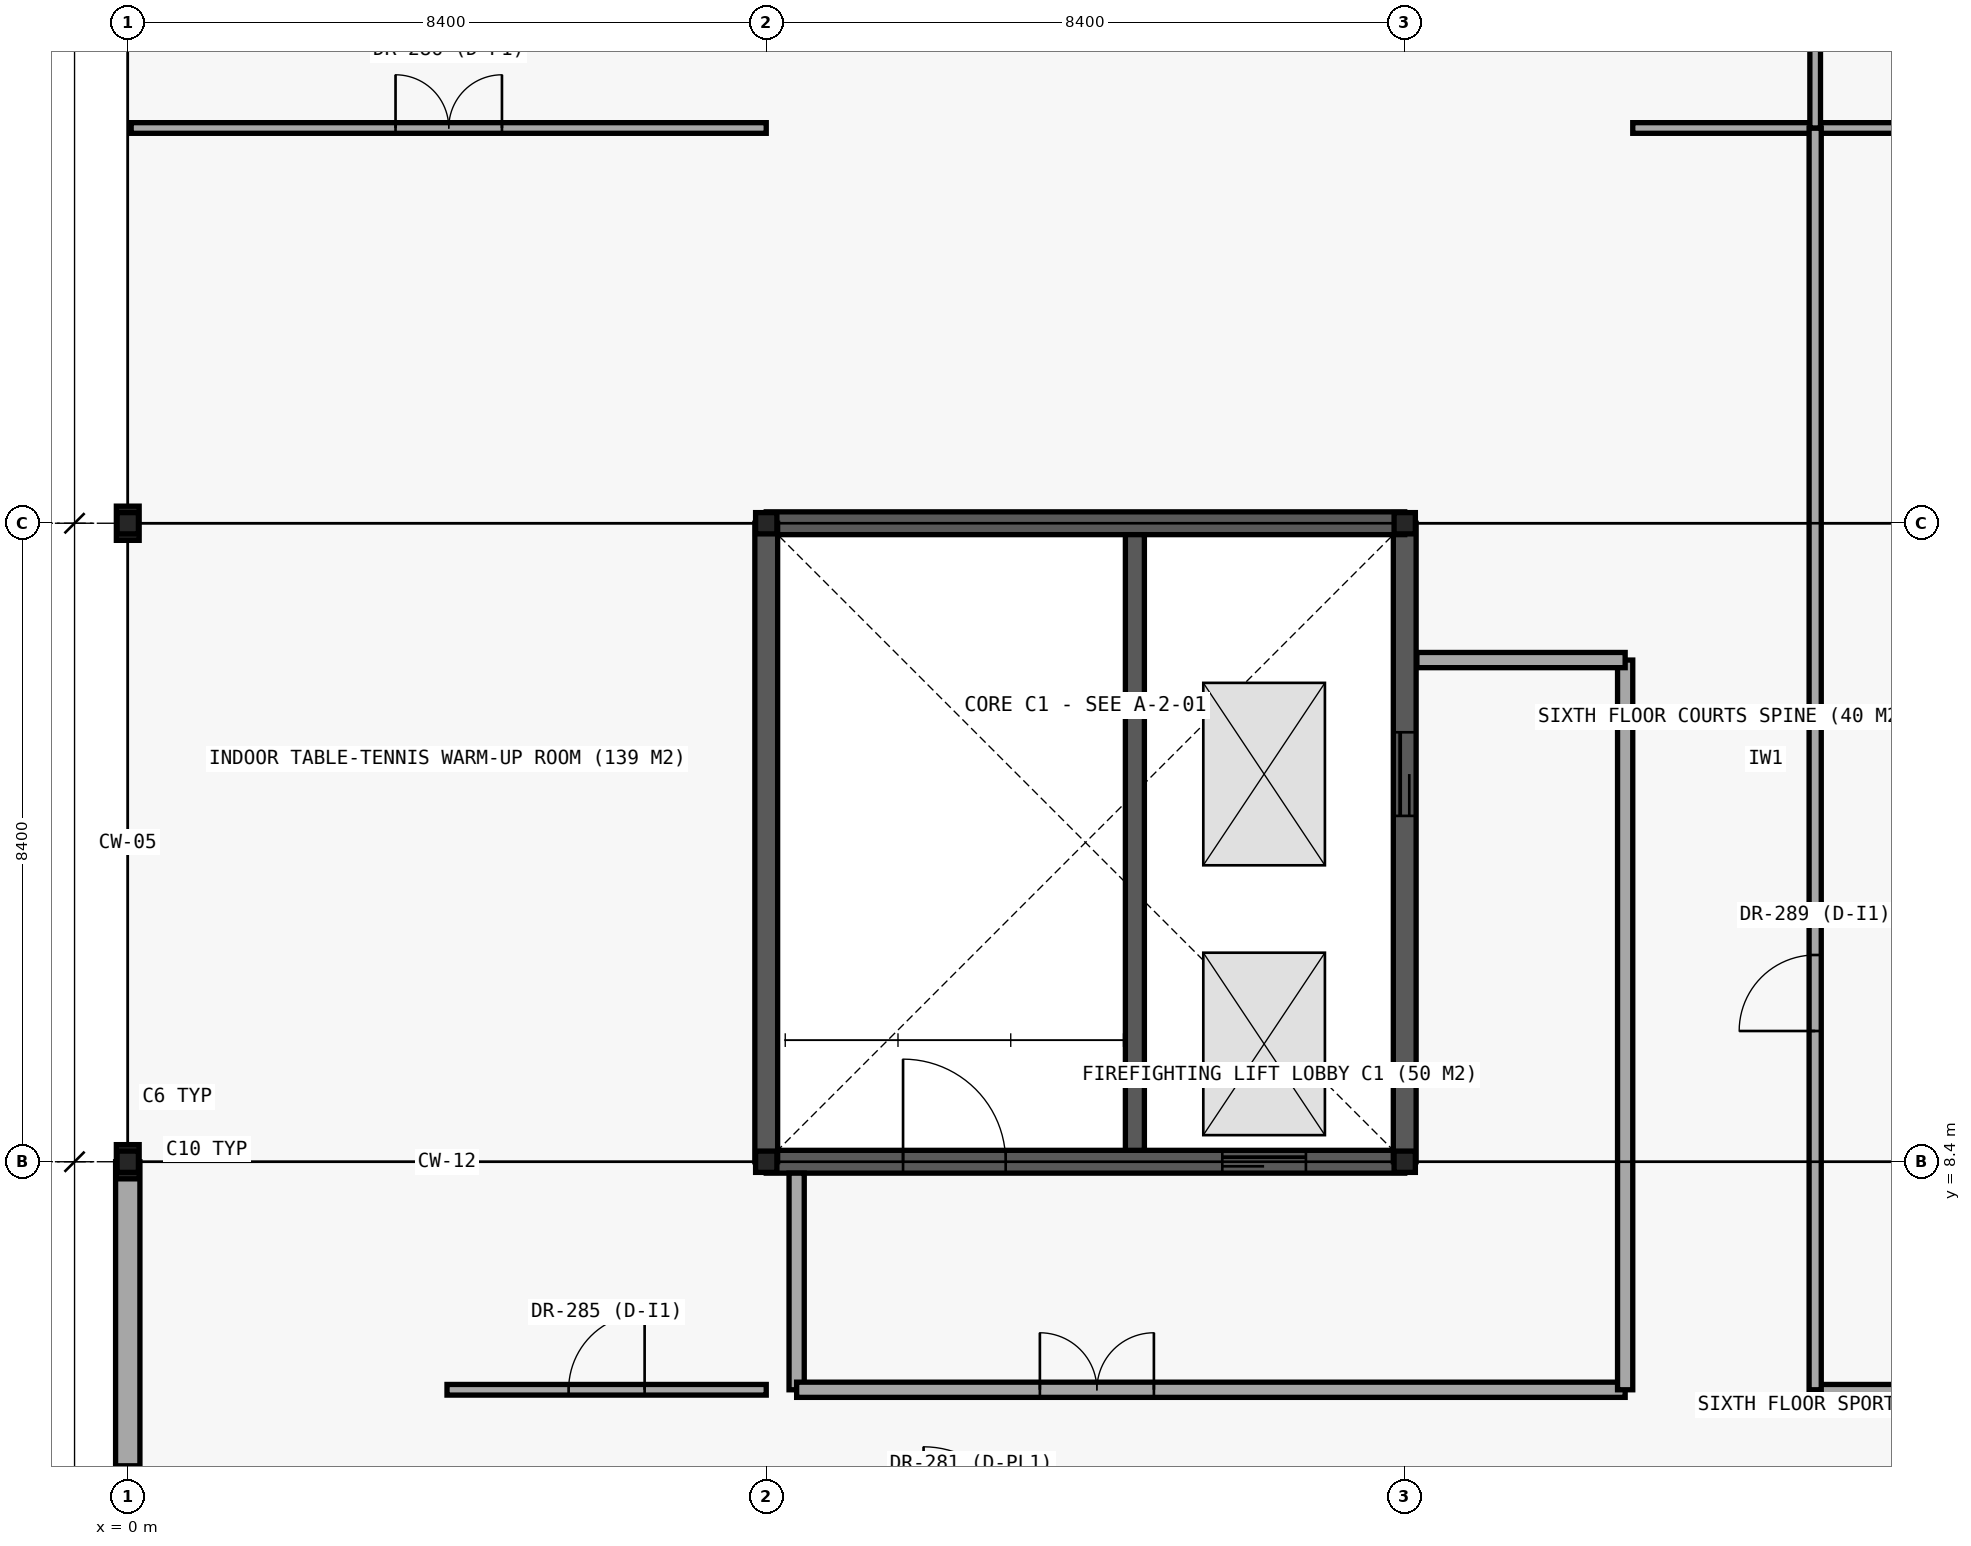
"""IFC4 building model, lengths in metres.
Left out: names, types, materials, properties, quantities, classifications, styles, units other than length and angle.
Written with IfcOpenShell. Run it as: python <this file> out.ifc"""

import sys

from ifc_helpers import new_model, si_unit, direction, frame, frame_2d, origin, origin_2d, place, context, subcontext, project, spatial, rectangle, i_section, extrude, element, fill, save


model = new_model("IFC4")
c1 = context("Model", 3, precision=1e-05, world=origin(), true_north=direction((0.0, 1.0)))
c2 = subcontext(c1, "Body", "Model", "MODEL_VIEW")
j1 = project(units=[si_unit("LENGTHUNIT", "METRE"), si_unit("PLANEANGLEUNIT", "RADIAN")], contexts=[c1])
p1 = place(None, origin())
s1 = spatial("IfcSite", under=j1, at=p1, CompositionType="ELEMENT")
p2 = place(p1, origin())
s2 = spatial("IfcBuilding", under=s1, at=p2, CompositionType="ELEMENT")
p3 = place(p2, frame((0.0, 0.0, 26.4)))
s3 = spatial("IfcBuildingStorey", under=s2, at=p3, CompositionType="ELEMENT", Elevation=26.4)
p4 = place(p3, frame((8.4, 8.4, 0.0), z_axis=(0.0, 0.0, 1.0), x_axis=(1.0, 0.0, 0.0)))
e1 = element("IfcWall", 1, at=p4, inside=s3, PredefinedType="SHEAR", context=c2, shape_type="SweptSolid", body=[
    extrude(rectangle(XDim=8.4, YDim=0.3, at=frame_2d((4.2, 0.0))), origin(), (0.0, 0.0, 1.0), 4.8),
])
p5 = place(p4, frame((1.8, 0.0, 0.0)))
e2 = element("IfcOpeningElement", 2, at=p5, cuts=e1, PredefinedType="OPENING", context=c2, shape_type="SweptSolid", body=[
    extrude(rectangle(XDim=1.35, YDim=2.2, at=frame_2d((0.675, 1.1))), frame((0.0, 0.16, 0.0), z_axis=(0.0, -1.0, 0.0), x_axis=(1.0, 0.0, 0.0)), (0.0, 0.0, 1.0), 0.32),
])
p6 = place(p4, frame((6.0, 0.0, 0.0)))
e3 = element("IfcOpeningElement", 3, at=p6, cuts=e1, PredefinedType="OPENING", context=c2, shape_type="SweptSolid", body=[
    extrude(rectangle(XDim=1.1, YDim=2.2, at=frame_2d((0.55, 1.1))), frame((0.0, 0.16, 0.0), z_axis=(0.0, -1.0, 0.0), x_axis=(1.0, 0.0, 0.0)), (0.0, 0.0, 1.0), 0.32),
])
p7 = place(p3, frame((16.8, 8.4, 0.0), z_axis=(0.0, 0.0, 1.0), x_axis=(0.0, 1.0, 0.0)))
e4 = element("IfcWall", 4, at=p7, inside=s3, PredefinedType="SHEAR", context=c2, shape_type="SweptSolid", body=[
    extrude(rectangle(XDim=8.4, YDim=0.3, at=frame_2d((4.2, 0.0))), origin(), (0.0, 0.0, 1.0), 4.8),
])
p8 = place(p7, frame((4.55, 0.0, 0.0)))
e5 = element("IfcOpeningElement", 5, at=p8, cuts=e4, PredefinedType="OPENING", context=c2, shape_type="SweptSolid", body=[
    extrude(rectangle(XDim=1.1, YDim=2.2, at=frame_2d((0.55, 1.1))), frame((0.0, 0.16, 0.0), z_axis=(0.0, -1.0, 0.0), x_axis=(1.0, 0.0, 0.0)), (0.0, 0.0, 1.0), 0.32),
])
for number, where, z_axis, x_axis in (
    (6, (16.8, 16.8, 0.0), (0.0, 0.0, 1.0), (-1.0, 0.0, 0.0)),
    (7, (8.4, 16.8, 0.0), (0.0, 0.0, 1.0), (0.0, -1.0, 0.0)),
):
    element("IfcWall", number, at=place(p3, frame(where, z_axis=z_axis, x_axis=x_axis)), inside=s3, PredefinedType="SHEAR", context=c2, shape_type="SweptSolid", body=[
        extrude(rectangle(XDim=8.4, YDim=0.3, at=frame_2d((4.2, 0.0))), origin(), (0.0, 0.0, 1.0), 4.8),
    ])
p9 = place(p3, frame((13.25, 8.55, 0.0), z_axis=(0.0, 0.0, 1.0), x_axis=(0.0, 1.0, 0.0)))
e8 = element("IfcWall", 8, at=p9, inside=s3, PredefinedType="SHEAR", context=c2, shape_type="SweptSolid", body=[
    extrude(rectangle(XDim=8.1, YDim=0.25, at=frame_2d((4.05, 0.0))), origin(), (0.0, 0.0, 1.0), 4.8),
])
for number, where, z_axis, x_axis in (
    (9, (0.0, 8.4, 0.0), (0.0, 0.0, 1.0), (1.0, 0.0, 0.0)),
    (10, (0.0, 16.8, 0.0), (0.0, 0.0, 1.0), (1.0, 0.0, 0.0)),
):
    element("IfcColumn", number, at=place(p3, frame(where, z_axis=z_axis, x_axis=x_axis)), inside=s3, PredefinedType="COLUMN", context=c2, shape_type="SweptSolid", body=[
        extrude(i_section(OverallWidth=0.3, OverallDepth=0.45, WebThickness=0.014, FlangeThickness=0.026, FilletRadius=0.027, at=origin_2d()), origin(), (0.0, 0.0, 1.0), 4.63),
    ])
for number, where, z_axis, x_axis in (
    (11, (0.0, 8.4, 4.63), (0.0, 0.0, 1.0), (1.0, 0.0, 0.0)),
    (12, (8.4, 8.4, 4.63), (0.0, 0.0, 1.0), (1.0, 0.0, 0.0)),
    (13, (16.8, 8.4, 4.63), (0.0, 0.0, 1.0), (1.0, 0.0, 0.0)),
    (14, (0.0, 16.8, 4.63), (0.0, 0.0, 1.0), (1.0, 0.0, 0.0)),
    (15, (8.4, 16.8, 4.63), (0.0, 0.0, 1.0), (1.0, 0.0, 0.0)),
    (16, (16.8, 16.8, 4.63), (0.0, 0.0, 1.0), (1.0, 0.0, 0.0)),
):
    element("IfcColumn", number, at=place(p3, frame(where, z_axis=z_axis, x_axis=x_axis)), inside=s3, PredefinedType="COLUMN", context=c2, shape_type="SweptSolid", body=[
        extrude(i_section(OverallWidth=0.28, OverallDepth=0.28, WebThickness=0.01, FlangeThickness=0.018, FilletRadius=0.024, at=origin_2d()), origin(), (0.0, 0.0, 1.0), 2.4),
    ])
p10 = place(p3, frame((0.0, 8.4, 0.0), z_axis=(0.0, 0.0, 1.0), x_axis=(0.0, -1.0, 0.0)))
e17 = element("IfcWall", 17, at=p10, inside=s3, PredefinedType="STANDARD", context=c2, shape_type="SweptSolid", body=[
    extrude(rectangle(XDim=4.2, YDim=0.32, at=frame_2d((2.1, 0.0))), origin(), (0.0, 0.0, 1.0), 4.06),
])
p11 = place(p3, frame((8.8, 5.4, 0.0), z_axis=(0.0, 0.0, 1.0), x_axis=(0.0, 1.0, 0.0)))
e18 = element("IfcWall", 18, at=p11, inside=s3, PredefinedType="PARTITIONING", context=c2, shape_type="SweptSolid", body=[
    extrude(rectangle(XDim=2.85, YDim=0.2, at=frame_2d((1.425, 0.0))), origin(), (0.0, 0.0, 1.0), 4.12),
])
p12 = place(p3, frame((8.8, 5.4, 0.0), z_axis=(0.0, 0.0, 1.0), x_axis=(1.0, 0.0, 0.0)))
e19 = element("IfcWall", 19, at=p12, inside=s3, PredefinedType="PARTITIONING", context=c2, shape_type="SweptSolid", body=[
    extrude(rectangle(XDim=10.9, YDim=0.2, at=frame_2d((5.45, 0.0))), origin(), (0.0, 0.0, 1.0), 4.12),
])
p13 = place(p12, frame((3.2, 0.0, 0.0)))
e20 = element("IfcOpeningElement", 20, at=p13, cuts=e19, PredefinedType="OPENING", context=c2, shape_type="SweptSolid", body=[
    extrude(rectangle(XDim=1.5, YDim=2.2, at=frame_2d((0.75, 1.1))), frame((0.0, 0.11, 0.0), z_axis=(0.0, -1.0, 0.0), x_axis=(1.0, 0.0, 0.0)), (0.0, 0.0, 1.0), 0.22),
])
p14 = place(p3, frame((19.7, 5.4, 0.0), z_axis=(0.0, 0.0, 1.0), x_axis=(0.0, 1.0, 0.0)))
e21 = element("IfcWall", 21, at=p14, inside=s3, PredefinedType="PARTITIONING", context=c2, shape_type="SweptSolid", body=[
    extrude(rectangle(XDim=9.6, YDim=0.2, at=frame_2d((4.8, 0.0))), origin(), (0.0, 0.0, 1.0), 4.12),
])
p15 = place(p3, frame((16.96, 15.0, 0.0), z_axis=(0.0, 0.0, 1.0), x_axis=(1.0, 0.0, 0.0)))
e22 = element("IfcWall", 22, at=p15, inside=s3, PredefinedType="PARTITIONING", context=c2, shape_type="SweptSolid", body=[
    extrude(rectangle(XDim=2.74, YDim=0.2, at=frame_2d((1.37, 0.0))), origin(), (0.0, 0.0, 1.0), 4.12),
])
p16 = place(p3, frame((4.2, 5.4, 0.0), z_axis=(0.0, 0.0, 1.0), x_axis=(1.0, 0.0, 0.0)))
e23 = element("IfcWall", 23, at=p16, inside=s3, PredefinedType="PARTITIONING", context=c2, shape_type="SweptSolid", body=[
    extrude(rectangle(XDim=4.2, YDim=0.14, at=frame_2d((2.1, 0.0))), origin(), (0.0, 0.0, 1.0), 4.1),
])
p17 = place(p16, frame((1.6, 0.0, 0.0)))
e24 = element("IfcOpeningElement", 24, at=p17, cuts=e23, PredefinedType="OPENING", context=c2, shape_type="SweptSolid", body=[
    extrude(rectangle(XDim=1.0, YDim=2.15, at=frame_2d((0.5, 1.075))), frame((0.0, 0.08, 0.0), z_axis=(0.0, -1.0, 0.0), x_axis=(1.0, 0.0, 0.0)), (0.0, 0.0, 1.0), 0.16),
])
p18 = place(p3, frame((22.2, 5.4, 0.0), z_axis=(0.0, 0.0, 1.0), x_axis=(1.0, 0.0, 0.0)))
e25 = element("IfcWall", 25, at=p18, inside=s3, PredefinedType="PARTITIONING", context=c2, shape_type="SweptSolid", body=[
    extrude(rectangle(XDim=11.4, YDim=0.14, at=frame_2d((5.7, 0.0))), origin(), (0.0, 0.0, 1.0), 4.1),
])
p19 = place(p3, frame((0.045, 22.0, 0.0), z_axis=(0.0, 0.0, 1.0), x_axis=(1.0, 0.0, 0.0)))
e26 = element("IfcWall", 26, at=p19, inside=s3, PredefinedType="PARTITIONING", context=c2, shape_type="SweptSolid", body=[
    extrude(rectangle(XDim=8.355, YDim=0.14, at=frame_2d((4.177, 0.0))), origin(), (0.0, 0.0, 1.0), 4.1),
])
p20 = place(p19, frame((3.478, 0.0, 0.0)))
e27 = element("IfcOpeningElement", 27, at=p20, cuts=e26, PredefinedType="OPENING", context=c2, shape_type="SweptSolid", body=[
    extrude(rectangle(XDim=1.4, YDim=2.25, at=frame_2d((0.7, 1.125))), frame((0.0, 0.08, 0.0), z_axis=(0.0, -1.0, 0.0), x_axis=(1.0, 0.0, 0.0)), (0.0, 0.0, 1.0), 0.16),
])
p21 = place(p3, frame((19.8, 22.0, 0.0), z_axis=(0.0, 0.0, 1.0), x_axis=(1.0, 0.0, 0.0)))
e28 = element("IfcWall", 28, at=p21, inside=s3, PredefinedType="PARTITIONING", context=c2, shape_type="SweptSolid", body=[
    extrude(rectangle(XDim=2.4, YDim=0.14, at=frame_2d((1.2, 0.0))), origin(), (0.0, 0.0, 1.0), 4.1),
])
p22 = place(p3, frame((22.2, 22.0, 0.0), z_axis=(0.0, 0.0, 1.0), x_axis=(1.0, 0.0, 0.0)))
e29 = element("IfcWall", 29, at=p22, inside=s3, PredefinedType="PARTITIONING", context=c2, shape_type="SweptSolid", body=[
    extrude(rectangle(XDim=11.4, YDim=0.14, at=frame_2d((5.7, 0.0))), origin(), (0.0, 0.0, 1.0), 4.1),
])
p23 = place(p22, frame((5.2, 0.0, 0.0)))
e30 = element("IfcOpeningElement", 30, at=p23, cuts=e29, PredefinedType="OPENING", context=c2, shape_type="SweptSolid", body=[
    extrude(rectangle(XDim=1.0, YDim=2.15, at=frame_2d((0.5, 1.075))), frame((0.0, 0.08, 0.0), z_axis=(0.0, -1.0, 0.0), x_axis=(1.0, 0.0, 0.0)), (0.0, 0.0, 1.0), 0.16),
])
p24 = place(p3, frame((22.2, 5.4, 0.0), z_axis=(0.0, 0.0, 1.0), x_axis=(0.0, 1.0, 0.0)))
e31 = element("IfcWall", 31, at=p24, inside=s3, PredefinedType="PARTITIONING", context=c2, shape_type="SweptSolid", body=[
    extrude(rectangle(XDim=16.6, YDim=0.16, at=frame_2d((8.3, 0.0))), origin(), (0.0, 0.0, 1.0), 4.1),
])
p25 = place(p24, frame((4.72, 0.0, 0.0)))
e32 = element("IfcOpeningElement", 32, at=p25, cuts=e31, PredefinedType="OPENING", context=c2, shape_type="SweptSolid", body=[
    extrude(rectangle(XDim=1.0, YDim=2.15, at=frame_2d((0.5, 1.075))), frame((0.0, 0.09, 0.0), z_axis=(0.0, -1.0, 0.0), x_axis=(1.0, 0.0, 0.0)), (0.0, 0.0, 1.0), 0.18),
])
p26 = place(p3, frame((22.2, 22.0, 0.0), z_axis=(0.0, 0.0, 1.0), x_axis=(0.0, 1.0, 0.0)))
e33 = element("IfcWall", 33, at=p26, inside=s3, PredefinedType="PARTITIONING", context=c2, shape_type="SweptSolid", body=[
    extrude(rectangle(XDim=6.0, YDim=0.14, at=frame_2d((3.0, 0.0))), origin(), (0.0, 0.0, 1.0), 4.1),
])
p27 = place(p5, origin())
e34 = element("IfcDoor", 34, at=p27, inside=s3, OperationType="SINGLE_SWING_LEFT", PredefinedType="DOOR", context=c2, shape_type="SweptSolid", body=[
    extrude(rectangle(XDim=1.35, YDim=2.2, at=frame_2d((0.675, 1.1))), frame((0.0, 0.025, 0.0), z_axis=(0.0, -1.0, 0.0), x_axis=(1.0, 0.0, 0.0)), (0.0, 0.0, 1.0), 0.05),
])
fill(e2, e34)
p28 = place(p6, origin())
e35 = element("IfcDoor", 35, at=p28, inside=s3, OperationType="SLIDING_TO_LEFT", PredefinedType="DOOR", context=c2, shape_type="SweptSolid", body=[
    extrude(rectangle(XDim=1.1, YDim=2.2, at=frame_2d((0.55, 1.1))), frame((0.0, 0.025, 0.0), z_axis=(0.0, -1.0, 0.0), x_axis=(1.0, 0.0, 0.0)), (0.0, 0.0, 1.0), 0.05),
])
fill(e3, e35)
p29 = place(p8, origin())
e36 = element("IfcDoor", 36, at=p29, inside=s3, OperationType="SLIDING_TO_RIGHT", PredefinedType="DOOR", context=c2, shape_type="SweptSolid", body=[
    extrude(rectangle(XDim=1.1, YDim=2.2, at=frame_2d((0.55, 1.1))), frame((0.0, 0.025, 0.0), z_axis=(0.0, -1.0, 0.0), x_axis=(1.0, 0.0, 0.0)), (0.0, 0.0, 1.0), 0.05),
])
fill(e5, e36)
p30 = place(p13, origin())
e37 = element("IfcDoor", 37, at=p30, inside=s3, OperationType="DOUBLE_DOOR_SINGLE_SWING", PredefinedType="DOOR", context=c2, shape_type="SweptSolid", body=[
    extrude(rectangle(XDim=1.5, YDim=2.2, at=frame_2d((0.75, 1.1))), frame((0.0, 0.025, 0.0), z_axis=(0.0, -1.0, 0.0), x_axis=(1.0, 0.0, 0.0)), (0.0, 0.0, 1.0), 0.05),
])
fill(e20, e37)
p31 = place(p17, origin())
e38 = element("IfcDoor", 38, at=p31, inside=s3, OperationType="SINGLE_SWING_RIGHT", PredefinedType="DOOR", context=c2, shape_type="SweptSolid", body=[
    extrude(rectangle(XDim=1.0, YDim=2.15, at=frame_2d((0.5, 1.075))), frame((0.0, 0.025, 0.0), z_axis=(0.0, -1.0, 0.0), x_axis=(1.0, 0.0, 0.0)), (0.0, 0.0, 1.0), 0.05),
])
fill(e24, e38)
p32 = place(p20, origin())
e39 = element("IfcDoor", 39, at=p32, inside=s3, OperationType="DOUBLE_DOOR_SINGLE_SWING", PredefinedType="DOOR", context=c2, shape_type="SweptSolid", body=[
    extrude(rectangle(XDim=1.4, YDim=2.25, at=frame_2d((0.7, 1.125))), frame((0.0, 0.025, 0.0), z_axis=(0.0, -1.0, 0.0), x_axis=(1.0, 0.0, 0.0)), (0.0, 0.0, 1.0), 0.05),
])
fill(e27, e39)
p33 = place(p25, origin())
e40 = element("IfcDoor", 40, at=p33, inside=s3, OperationType="SINGLE_SWING_LEFT", PredefinedType="DOOR", context=c2, shape_type="SweptSolid", body=[
    extrude(rectangle(XDim=1.0, YDim=2.15, at=frame_2d((0.5, 1.075))), frame((0.0, 0.025, 0.0), z_axis=(0.0, -1.0, 0.0), x_axis=(1.0, 0.0, 0.0)), (0.0, 0.0, 1.0), 0.05),
])
fill(e32, e40)
save(model, sys.argv[1])
